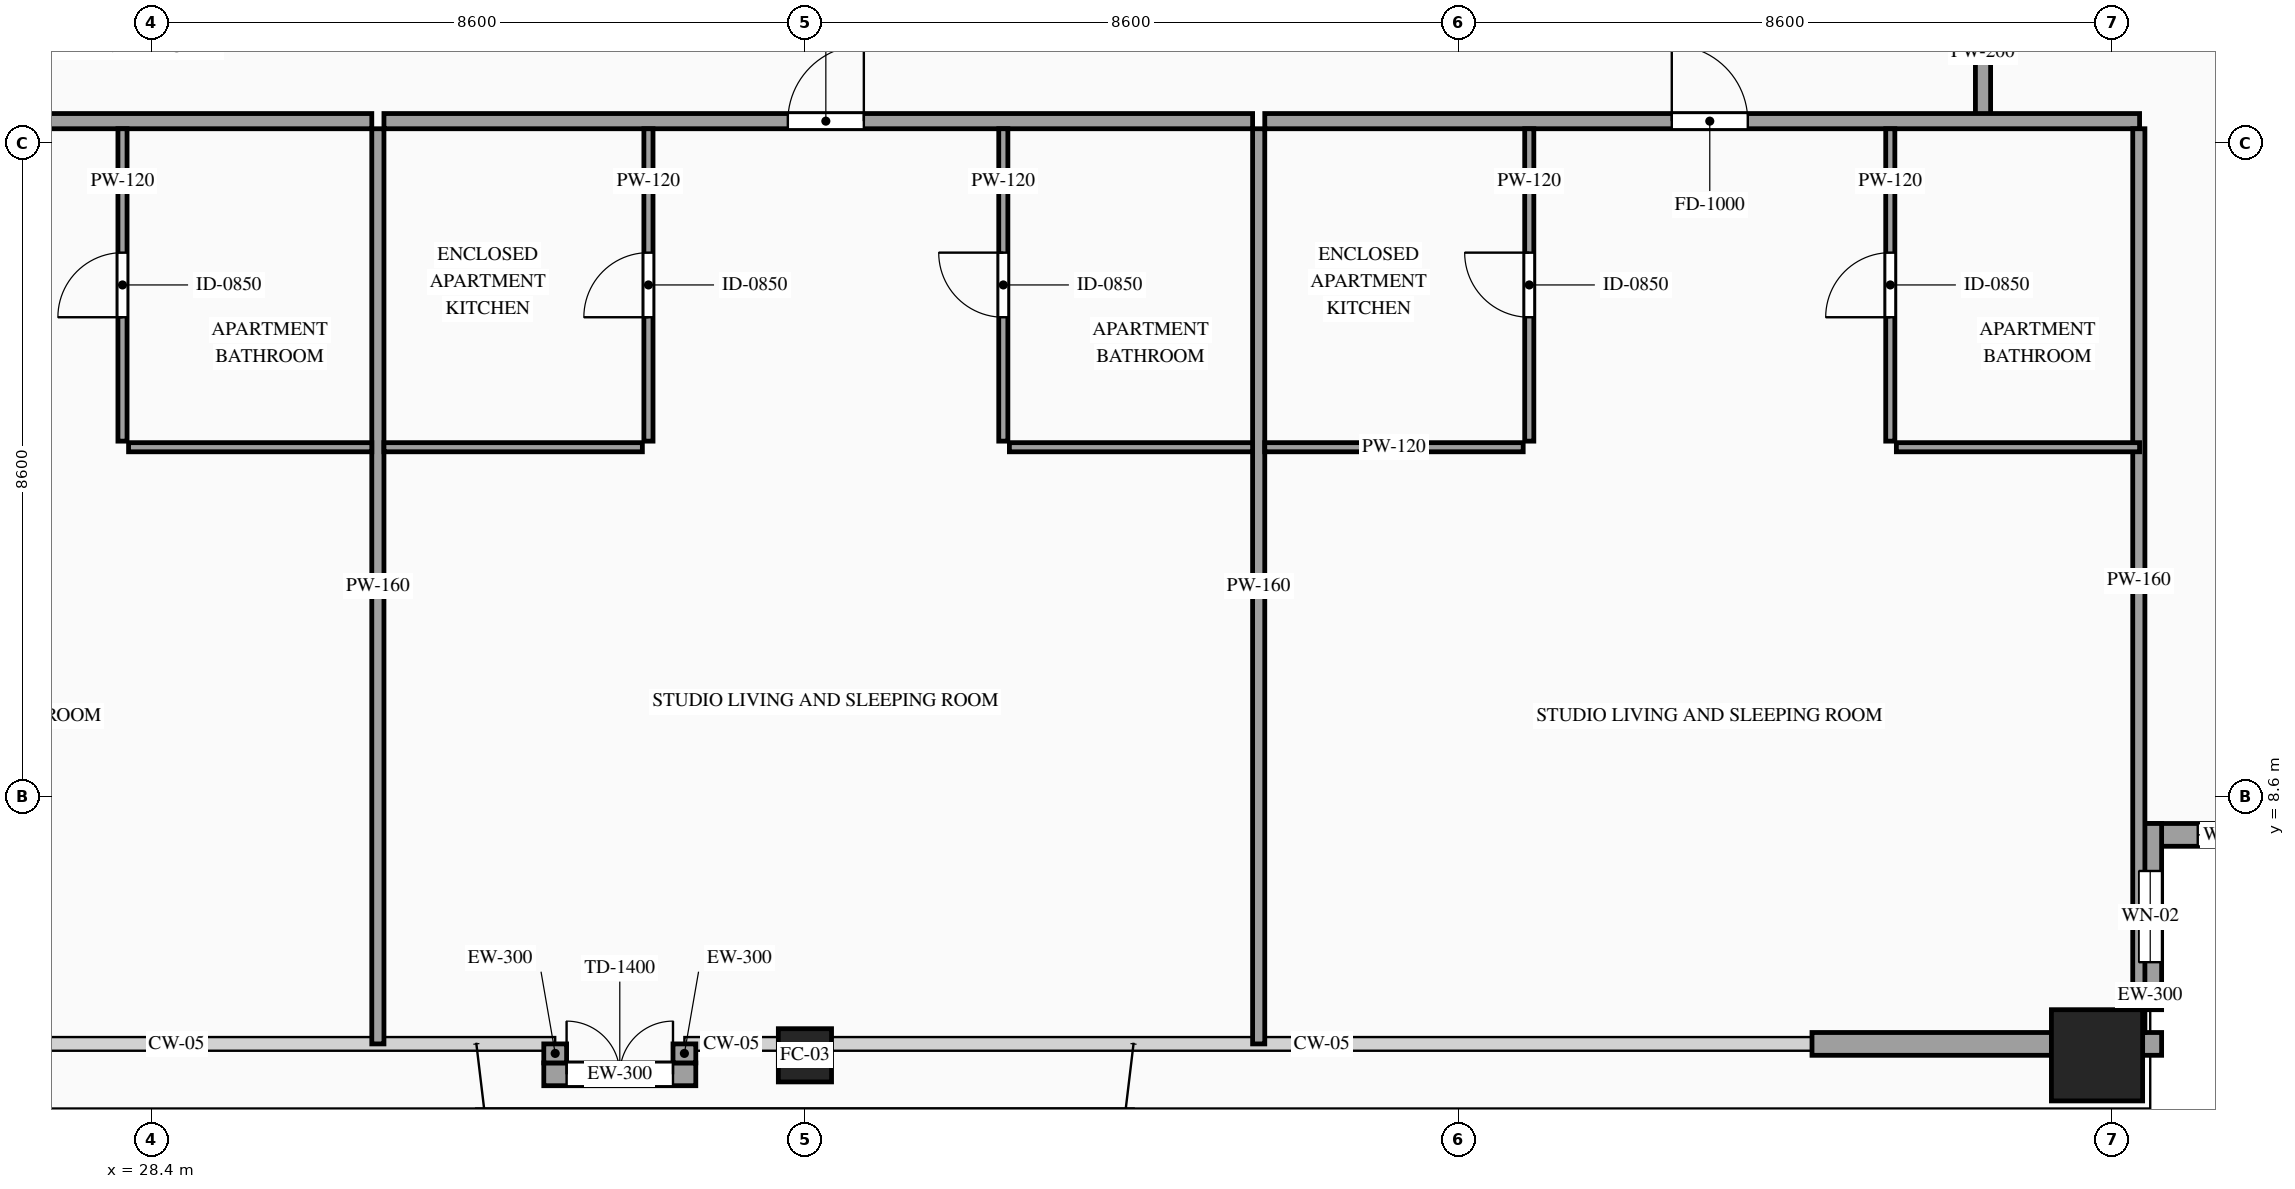
"""IFC4 building model, lengths in metres.
Left out: names, types, materials, properties, quantities, classifications, styles, units other than length and angle.
Written with IfcOpenShell. Run it as: python <this file> out.ifc"""

import sys

from ifc_helpers import new_model, si_unit, direction, frame, frame_2d, origin, origin_2d, place, context, subcontext, project, spatial, rectangle, hollow_rectangle, extrude, source, transform, mapped, element, fill, save


model = new_model("IFC4")
c1 = context("Model", 3, precision=1e-05, world=origin(), true_north=direction((0.0, 1.0)))
c2 = subcontext(c1, "Body", "Model", "MODEL_VIEW")
j1 = project(units=[si_unit("LENGTHUNIT", "METRE"), si_unit("PLANEANGLEUNIT", "RADIAN")], contexts=[c1])
p1 = place(None, origin())
s1 = spatial("IfcSite", under=j1, at=p1, CompositionType="ELEMENT")
p2 = place(p1, origin())
s2 = spatial("IfcBuilding", under=s1, at=p2, CompositionType="ELEMENT")
p3 = place(p2, frame((0.0, 0.0, 271.6)))
s3 = spatial("IfcBuildingStorey", under=s2, at=p3, CompositionType="ELEMENT", Elevation=271.6)
m1 = source(origin(), c2, "Body", "SweptSolid", [
    extrude(hollow_rectangle(XDim=0.7, YDim=0.7, WallThickness=0.032, at=origin_2d()), origin(), (0.0, 0.0, 1.0), 3.5),
])
p4 = place(p3, frame((37.0, 5.2, 0.0), z_axis=(0.0, 0.0, 1.0), x_axis=(1.0, 0.0, 0.0)))
e1 = element("IfcColumn", 1, at=p4, inside=s3, PredefinedType="COLUMN", context=c2, shape_type="MappedRepresentation", body=[
    mapped(m1, transform((0.0, 0.0, 0.0), scale=1.0)),
])
m2 = source(origin(), c2, "Body", "SweptSolid", [
    extrude(hollow_rectangle(XDim=1.2, YDim=1.2, WallThickness=0.055, at=origin_2d()), origin(), (0.0, 0.0, 1.0), 3.5),
])
p5 = place(p3, frame((54.0, 5.2, 0.0), z_axis=(0.0, 0.0, 1.0), x_axis=(1.0, 0.0, 0.0)))
e2 = element("IfcColumn", 2, at=p5, inside=s3, PredefinedType="COLUMN", context=c2, shape_type="MappedRepresentation", body=[
    mapped(m2, transform((0.0, 0.0, 0.0), scale=1.0)),
])
p6 = place(p3, frame((54.55, 8.1, 0.0), z_axis=(0.0, 0.0, 1.0), x_axis=(1.0, 0.0, 0.0)))
e3 = element("IfcWall", 3, at=p6, inside=s3, PredefinedType="SOLIDWALL", context=c2, shape_type="SweptSolid", body=[
    extrude(rectangle(XDim=2.45, YDim=0.3, at=frame_2d((1.225, 0.0))), origin(), (0.0, 0.0, 1.0), 3.28),
])
p7 = place(p6, frame((0.775, 0.0, 0.85)))
e4 = element("IfcOpeningElement", 4, at=p7, cuts=e3, PredefinedType="OPENING", context=c2, shape_type="SweptSolid", body=[
    extrude(rectangle(XDim=0.9, YDim=1.5, at=frame_2d((0.45, 0.75))), frame((0.0, 0.165, 0.0), z_axis=(0.0, -1.0, 0.0), x_axis=(1.0, 0.0, 0.0)), (0.0, 0.0, 1.0), 0.33),
])
p8 = place(p3, frame((54.7, 5.8, 0.0), z_axis=(0.0, 0.0, 1.0), x_axis=(0.0, 1.0, 0.0)))
e5 = element("IfcWall", 5, at=p8, inside=s3, PredefinedType="SOLIDWALL", context=c2, shape_type="SweptSolid", body=[
    extrude(rectangle(XDim=2.45, YDim=0.3, at=frame_2d((1.225, 0.0))), origin(), (0.0, 0.0, 1.0), 3.28),
])
p9 = place(p8, frame((0.625, 0.0, 0.85)))
e6 = element("IfcOpeningElement", 6, at=p9, cuts=e5, PredefinedType="OPENING", context=c2, shape_type="SweptSolid", body=[
    extrude(rectangle(XDim=1.2, YDim=2.1, at=frame_2d((0.6, 1.05))), frame((0.0, 0.165, 0.0), z_axis=(0.0, -1.0, 0.0), x_axis=(1.0, 0.0, 0.0)), (0.0, 0.0, 1.0), 0.33),
])
m3 = source(origin(), c2, "Body", "SweptSolid", [
    extrude(rectangle(XDim=0.25, YDim=0.3, at=frame_2d((0.125, 0.0))), origin(), (0.0, 0.0, 1.0), 3.28),
])
p10 = place(p3, frame((54.6, 5.35, 0.0), z_axis=(0.0, 0.0, 1.0), x_axis=(1.0, 0.0, 0.0)))
e7 = element("IfcWall", 7, at=p10, inside=s3, PredefinedType="SOLIDWALL", context=c2, shape_type="MappedRepresentation", body=[
    mapped(m3, transform((0.0, 0.0, 0.0), scale=1.0)),
])
m4 = source(origin(), c2, "Body", "SweptSolid", [
    extrude(rectangle(XDim=3.15, YDim=0.3, at=frame_2d((1.575, 0.0))), origin(), (0.0, 0.0, 1.0), 2.835),
])
p11 = place(p3, frame((50.25, 5.35, 0.0), z_axis=(0.0, 0.0, 1.0), x_axis=(1.0, 0.0, 0.0)))
e8 = element("IfcWall", 8, at=p11, inside=s3, PredefinedType="SOLIDWALL", context=c2, shape_type="MappedRepresentation", body=[
    mapped(m4, transform((0.0, 0.0, 0.0), scale=1.0)),
])
p12 = place(p3, frame((33.564, 4.95, 0.0), z_axis=(0.0, 0.0, 1.0), x_axis=(1.0, 0.0, 0.0)))
e9 = element("IfcWall", 9, at=p12, inside=s3, PredefinedType="SOLIDWALL", context=c2, shape_type="SweptSolid", body=[
    extrude(rectangle(XDim=2.0, YDim=0.3, at=frame_2d((1.0, 0.0))), origin(), (0.0, 0.0, 1.0), 2.835),
])
p13 = place(p12, frame((0.3, 0.0, 0.0)))
e10 = element("IfcOpeningElement", 10, at=p13, cuts=e9, PredefinedType="OPENING", context=c2, shape_type="SweptSolid", body=[
    extrude(rectangle(XDim=1.4, YDim=2.3, at=frame_2d((0.7, 1.15))), frame((0.0, 0.165, 0.0), z_axis=(0.0, -1.0, 0.0), x_axis=(1.0, 0.0, 0.0)), (0.0, 0.0, 1.0), 0.33),
])
for number, where, z_axis, x_axis in (
    (11, (33.714, 5.35, 0.0), (0.0, 0.0, 1.0), (0.0, -1.0, 0.0)),
    (12, (35.414, 5.1, 0.0), (0.0, 0.0, 1.0), (0.0, 1.0, 0.0)),
):
    element("IfcWall", number, at=place(p3, frame(where, z_axis=z_axis, x_axis=x_axis)), inside=s3, PredefinedType="SOLIDWALL", context=c2, shape_type="MappedRepresentation", body=[
        mapped(m3, transform((0.0, 0.0, 0.0), scale=1.0)),
    ])
m5 = source(origin(), c2, "Body", "SweptSolid", [
    extrude(rectangle(XDim=1.7, YDim=0.2, at=frame_2d((0.85, 0.0))), origin(), (0.0, 0.0, 1.0), 3.28),
])
p14 = place(p3, frame((52.5, 17.55, 0.0), z_axis=(0.0, 0.0, 1.0), x_axis=(0.0, 1.0, 0.0)))
e13 = element("IfcWall", 13, at=p14, inside=s3, PredefinedType="PARTITIONING", context=c2, shape_type="MappedRepresentation", body=[
    mapped(m5, transform((0.0, 0.0, 0.0), scale=1.0)),
])
p15 = place(p3, frame((19.44, 17.49, 0.0), z_axis=(0.0, 0.0, 1.0), x_axis=(1.0, 0.0, 0.0)))
e14 = element("IfcWall", 14, at=p15, inside=s3, PredefinedType="PARTITIONING", context=c2, shape_type="SweptSolid", body=[
    extrude(rectangle(XDim=11.861, YDim=0.2, at=frame_2d((5.931, 0.0))), origin(), (0.0, 0.0, 1.0), 3.28),
])
p16 = place(p15, frame((5.531, 0.0, 0.0)))
e15 = element("IfcOpeningElement", 15, at=p16, cuts=e14, PredefinedType="OPENING", context=c2, shape_type="SweptSolid", body=[
    extrude(rectangle(XDim=1.0, YDim=2.2, at=frame_2d((0.5, 1.1))), frame((0.0, 0.115, 0.0), z_axis=(0.0, -1.0, 0.0), x_axis=(1.0, 0.0, 0.0)), (0.0, 0.0, 1.0), 0.23),
])
m6 = source(origin(), c2, "Body", "SweptSolid", [
    extrude(rectangle(XDim=12.04, YDim=0.16, at=frame_2d((6.02, 0.0))), origin(), (0.0, 0.0, 1.0), 3.28),
])
p17 = place(p3, frame((31.381, 5.35, 0.0), z_axis=(0.0, 0.0, 1.0), x_axis=(0.0, 1.0, 0.0)))
e16 = element("IfcWall", 16, at=p17, inside=s3, PredefinedType="PARTITIONING", context=c2, shape_type="MappedRepresentation", body=[
    mapped(m6, transform((0.0, 0.0, 0.0), scale=1.0)),
])
m7 = source(origin(), c2, "Body", "SweptSolid", [
    extrude(rectangle(XDim=3.2, YDim=0.12, at=frame_2d((1.6, 0.0))), origin(), (0.0, 0.0, 1.0), 3.28),
])
p18 = place(p3, frame((28.101, 13.2, 0.0), z_axis=(0.0, 0.0, 1.0), x_axis=(1.0, 0.0, 0.0)))
e17 = element("IfcWall", 17, at=p18, inside=s3, PredefinedType="PARTITIONING", context=c2, shape_type="MappedRepresentation", body=[
    mapped(m7, transform((0.0, 0.0, 0.0), scale=1.0)),
])
p19 = place(p3, frame((28.021, 13.28, 0.0), z_axis=(0.0, 0.0, 1.0), x_axis=(0.0, 1.0, 0.0)))
e18 = element("IfcWall", 18, at=p19, inside=s3, PredefinedType="PARTITIONING", context=c2, shape_type="SweptSolid", body=[
    extrude(rectangle(XDim=4.11, YDim=0.12, at=frame_2d((2.055, 0.0))), origin(), (0.0, 0.0, 1.0), 3.28),
])
p20 = place(p19, frame((1.63, 0.0, 0.0)))
e19 = element("IfcOpeningElement", 19, at=p20, cuts=e18, PredefinedType="OPENING", context=c2, shape_type="SweptSolid", body=[
    extrude(rectangle(XDim=0.85, YDim=2.1, at=frame_2d((0.425, 1.05))), frame((0.0, 0.075, 0.0), z_axis=(0.0, -1.0, 0.0), x_axis=(1.0, 0.0, 0.0)), (0.0, 0.0, 1.0), 0.15),
])
p21 = place(p3, frame((31.461, 17.49, 0.0), z_axis=(0.0, 0.0, 1.0), x_axis=(1.0, 0.0, 0.0)))
e20 = element("IfcWall", 20, at=p21, inside=s3, PredefinedType="PARTITIONING", context=c2, shape_type="SweptSolid", body=[
    extrude(rectangle(XDim=11.429, YDim=0.2, at=frame_2d((5.714, 0.0))), origin(), (0.0, 0.0, 1.0), 3.28),
])
p22 = place(p21, frame((5.314, 0.0, 0.0)))
e21 = element("IfcOpeningElement", 21, at=p22, cuts=e20, PredefinedType="OPENING", context=c2, shape_type="SweptSolid", body=[
    extrude(rectangle(XDim=1.0, YDim=2.2, at=frame_2d((0.5, 1.1))), frame((0.0, 0.115, 0.0), z_axis=(0.0, -1.0, 0.0), x_axis=(1.0, 0.0, 0.0)), (0.0, 0.0, 1.0), 0.23),
])
p23 = place(p3, frame((42.97, 5.35, 0.0), z_axis=(0.0, 0.0, 1.0), x_axis=(0.0, 1.0, 0.0)))
e22 = element("IfcWall", 22, at=p23, inside=s3, PredefinedType="PARTITIONING", context=c2, shape_type="MappedRepresentation", body=[
    mapped(m6, transform((0.0, 0.0, 0.0), scale=1.0)),
])
m8 = source(origin(), c2, "Body", "SweptSolid", [
    extrude(rectangle(XDim=3.4, YDim=0.12, at=frame_2d((1.7, 0.0))), origin(), (0.0, 0.0, 1.0), 3.28),
])
p24 = place(p3, frame((31.461, 13.2, 0.0), z_axis=(0.0, 0.0, 1.0), x_axis=(1.0, 0.0, 0.0)))
e23 = element("IfcWall", 23, at=p24, inside=s3, PredefinedType="PARTITIONING", context=c2, shape_type="MappedRepresentation", body=[
    mapped(m8, transform((0.0, 0.0, 0.0), scale=1.0)),
])
p25 = place(p3, frame((34.941, 13.28, 0.0), z_axis=(0.0, 0.0, 1.0), x_axis=(0.0, 1.0, 0.0)))
e24 = element("IfcWall", 24, at=p25, inside=s3, PredefinedType="PARTITIONING", context=c2, shape_type="SweptSolid", body=[
    extrude(rectangle(XDim=4.11, YDim=0.12, at=frame_2d((2.055, 0.0))), origin(), (0.0, 0.0, 1.0), 3.28),
])
p26 = place(p25, frame((1.63, 0.0, 0.0)))
e25 = element("IfcOpeningElement", 25, at=p26, cuts=e24, PredefinedType="OPENING", context=c2, shape_type="SweptSolid", body=[
    extrude(rectangle(XDim=0.85, YDim=2.1, at=frame_2d((0.425, 1.05))), frame((0.0, 0.075, 0.0), z_axis=(0.0, -1.0, 0.0), x_axis=(1.0, 0.0, 0.0)), (0.0, 0.0, 1.0), 0.15),
])
p27 = place(p3, frame((39.69, 13.2, 0.0), z_axis=(0.0, 0.0, 1.0), x_axis=(1.0, 0.0, 0.0)))
e26 = element("IfcWall", 26, at=p27, inside=s3, PredefinedType="PARTITIONING", context=c2, shape_type="MappedRepresentation", body=[
    mapped(m7, transform((0.0, 0.0, 0.0), scale=1.0)),
])
p28 = place(p3, frame((39.61, 13.28, 0.0), z_axis=(0.0, 0.0, 1.0), x_axis=(0.0, 1.0, 0.0)))
e27 = element("IfcWall", 27, at=p28, inside=s3, PredefinedType="PARTITIONING", context=c2, shape_type="SweptSolid", body=[
    extrude(rectangle(XDim=4.11, YDim=0.12, at=frame_2d((2.055, 0.0))), origin(), (0.0, 0.0, 1.0), 3.28),
])
p29 = place(p28, frame((1.63, 0.0, 0.0)))
e28 = element("IfcOpeningElement", 28, at=p29, cuts=e27, PredefinedType="OPENING", context=c2, shape_type="SweptSolid", body=[
    extrude(rectangle(XDim=0.85, YDim=2.1, at=frame_2d((0.425, 1.05))), frame((0.0, 0.075, 0.0), z_axis=(0.0, -1.0, 0.0), x_axis=(1.0, 0.0, 0.0)), (0.0, 0.0, 1.0), 0.15),
])
p30 = place(p3, frame((43.05, 17.49, 0.0), z_axis=(0.0, 0.0, 1.0), x_axis=(1.0, 0.0, 0.0)))
e29 = element("IfcWall", 29, at=p30, inside=s3, PredefinedType="PARTITIONING", context=c2, shape_type="SweptSolid", body=[
    extrude(rectangle(XDim=11.51, YDim=0.2, at=frame_2d((5.755, 0.0))), origin(), (0.0, 0.0, 1.0), 3.28),
])
p31 = place(p30, frame((5.355, 0.0, 0.0)))
e30 = element("IfcOpeningElement", 30, at=p31, cuts=e29, PredefinedType="OPENING", context=c2, shape_type="SweptSolid", body=[
    extrude(rectangle(XDim=1.0, YDim=2.2, at=frame_2d((0.5, 1.1))), frame((0.0, 0.115, 0.0), z_axis=(0.0, -1.0, 0.0), x_axis=(1.0, 0.0, 0.0)), (0.0, 0.0, 1.0), 0.23),
])
m9 = source(origin(), c2, "Body", "SweptSolid", [
    extrude(rectangle(XDim=11.89, YDim=0.16, at=frame_2d((5.945, 0.0))), origin(), (0.0, 0.0, 1.0), 3.28),
])
p32 = place(p3, frame((54.55, 5.5, 0.0), z_axis=(0.0, 0.0, 1.0), x_axis=(0.0, 1.0, 0.0)))
e31 = element("IfcWall", 31, at=p32, inside=s3, PredefinedType="PARTITIONING", context=c2, shape_type="MappedRepresentation", body=[
    mapped(m9, transform((0.0, 0.0, 0.0), scale=1.0)),
])
m10 = source(origin(), c2, "Body", "SweptSolid", [
    extrude(rectangle(XDim=3.4, YDim=0.12, at=frame_2d((1.7, 0.0))), origin(), (0.0, 0.0, 1.0), 3.28),
])
p33 = place(p3, frame((43.05, 13.2, 0.0), z_axis=(0.0, 0.0, 1.0), x_axis=(1.0, 0.0, 0.0)))
e32 = element("IfcWall", 32, at=p33, inside=s3, PredefinedType="PARTITIONING", context=c2, shape_type="MappedRepresentation", body=[
    mapped(m10, transform((0.0, 0.0, 0.0), scale=1.0)),
])
p34 = place(p3, frame((46.53, 13.28, 0.0), z_axis=(0.0, 0.0, 1.0), x_axis=(0.0, 1.0, 0.0)))
e33 = element("IfcWall", 33, at=p34, inside=s3, PredefinedType="PARTITIONING", context=c2, shape_type="SweptSolid", body=[
    extrude(rectangle(XDim=4.11, YDim=0.12, at=frame_2d((2.055, 0.0))), origin(), (0.0, 0.0, 1.0), 3.28),
])
p35 = place(p34, frame((1.63, 0.0, 0.0)))
e34 = element("IfcOpeningElement", 34, at=p35, cuts=e33, PredefinedType="OPENING", context=c2, shape_type="SweptSolid", body=[
    extrude(rectangle(XDim=0.85, YDim=2.1, at=frame_2d((0.425, 1.05))), frame((0.0, 0.075, 0.0), z_axis=(0.0, -1.0, 0.0), x_axis=(1.0, 0.0, 0.0)), (0.0, 0.0, 1.0), 0.15),
])
p36 = place(p3, frame((51.36, 13.2, 0.0), z_axis=(0.0, 0.0, 1.0), x_axis=(1.0, 0.0, 0.0)))
e35 = element("IfcWall", 35, at=p36, inside=s3, PredefinedType="PARTITIONING", context=c2, shape_type="MappedRepresentation", body=[
    mapped(m7, transform((0.0, 0.0, 0.0), scale=1.0)),
])
p37 = place(p3, frame((51.28, 13.28, 0.0), z_axis=(0.0, 0.0, 1.0), x_axis=(0.0, 1.0, 0.0)))
e36 = element("IfcWall", 36, at=p37, inside=s3, PredefinedType="PARTITIONING", context=c2, shape_type="SweptSolid", body=[
    extrude(rectangle(XDim=4.11, YDim=0.12, at=frame_2d((2.055, 0.0))), origin(), (0.0, 0.0, 1.0), 3.28),
])
p38 = place(p37, frame((1.63, 0.0, 0.0)))
e37 = element("IfcOpeningElement", 37, at=p38, cuts=e36, PredefinedType="OPENING", context=c2, shape_type="SweptSolid", body=[
    extrude(rectangle(XDim=0.85, YDim=2.1, at=frame_2d((0.425, 1.05))), frame((0.0, 0.075, 0.0), z_axis=(0.0, -1.0, 0.0), x_axis=(1.0, 0.0, 0.0)), (0.0, 0.0, 1.0), 0.15),
])
m11 = source(origin(), c2, "Body", "SweptSolid", [
    extrude(rectangle(XDim=0.9, YDim=1.5, at=frame_2d((0.45, 0.75))), frame((0.0, 0.03, 0.0), z_axis=(0.0, -1.0, 0.0), x_axis=(1.0, 0.0, 0.0)), (0.0, 0.0, 1.0), 0.06),
])
p39 = place(p7, origin())
e38 = element("IfcWindow", 38, at=p39, inside=s3, PartitioningType="SINGLE_PANEL", PredefinedType="WINDOW", context=c2, shape_type="MappedRepresentation", body=[
    mapped(m11, transform((0.0, 0.0, 0.0), scale=1.0)),
])
fill(e4, e38)
m12 = source(origin(), c2, "Body", "SweptSolid", [
    extrude(rectangle(XDim=1.2, YDim=2.1, at=frame_2d((0.6, 1.05))), frame((0.0, 0.03, 0.0), z_axis=(0.0, -1.0, 0.0), x_axis=(1.0, 0.0, 0.0)), (0.0, 0.0, 1.0), 0.06),
])
p40 = place(p9, origin())
e39 = element("IfcWindow", 39, at=p40, inside=s3, PartitioningType="SINGLE_PANEL", PredefinedType="WINDOW", context=c2, shape_type="MappedRepresentation", body=[
    mapped(m12, transform((0.0, 0.0, 0.0), scale=1.0)),
])
fill(e6, e39)
m13 = source(origin(), c2, "Body", "SweptSolid", [
    extrude(rectangle(XDim=1.4, YDim=2.3, at=frame_2d((0.7, 1.15))), frame((0.0, 0.025, 0.0), z_axis=(0.0, -1.0, 0.0), x_axis=(1.0, 0.0, 0.0)), (0.0, 0.0, 1.0), 0.05),
])
p41 = place(p13, origin())
e40 = element("IfcDoor", 40, at=p41, inside=s3, OperationType="DOUBLE_DOOR_SINGLE_SWING", PredefinedType="DOOR", context=c2, shape_type="MappedRepresentation", body=[
    mapped(m13, transform((0.0, 0.0, 0.0), scale=1.0)),
])
fill(e10, e40)
m14 = source(origin(), c2, "Body", "SweptSolid", [
    extrude(rectangle(XDim=0.85, YDim=2.1, at=frame_2d((0.425, 1.05))), frame((0.0, 0.025, 0.0), z_axis=(0.0, -1.0, 0.0), x_axis=(1.0, 0.0, 0.0)), (0.0, 0.0, 1.0), 0.05),
])
p42 = place(p20, origin())
e41 = element("IfcDoor", 41, at=p42, inside=s3, OperationType="SINGLE_SWING_LEFT", PredefinedType="DOOR", context=c2, shape_type="MappedRepresentation", body=[
    mapped(m14, transform((0.0, 0.0, 0.0), scale=1.0)),
])
fill(e19, e41)
m15 = source(origin(), c2, "Body", "SweptSolid", [
    extrude(rectangle(XDim=1.0, YDim=2.2, at=frame_2d((0.5, 1.1))), frame((0.0, 0.025, 0.0), z_axis=(0.0, -1.0, 0.0), x_axis=(1.0, 0.0, 0.0)), (0.0, 0.0, 1.0), 0.05),
])
p43 = place(p22, origin())
e42 = element("IfcDoor", 42, at=p43, inside=s3, OperationType="SINGLE_SWING_RIGHT", PredefinedType="DOOR", context=c2, shape_type="MappedRepresentation", body=[
    mapped(m15, transform((0.0, 0.0, 0.0), scale=1.0)),
])
fill(e21, e42)
p44 = place(p26, origin())
e43 = element("IfcDoor", 43, at=p44, inside=s3, OperationType="SINGLE_SWING_LEFT", PredefinedType="DOOR", context=c2, shape_type="MappedRepresentation", body=[
    mapped(m14, transform((0.0, 0.0, 0.0), scale=1.0)),
])
fill(e25, e43)
p45 = place(p29, origin())
e44 = element("IfcDoor", 44, at=p45, inside=s3, OperationType="SINGLE_SWING_RIGHT", PredefinedType="DOOR", context=c2, shape_type="MappedRepresentation", body=[
    mapped(m14, transform((0.0, 0.0, 0.0), scale=1.0)),
])
fill(e28, e44)
p46 = place(p31, origin())
e45 = element("IfcDoor", 45, at=p46, inside=s3, OperationType="SINGLE_SWING_LEFT", PredefinedType="DOOR", context=c2, shape_type="MappedRepresentation", body=[
    mapped(m15, transform((0.0, 0.0, 0.0), scale=1.0)),
])
fill(e30, e45)
p47 = place(p35, origin())
e46 = element("IfcDoor", 46, at=p47, inside=s3, OperationType="SINGLE_SWING_RIGHT", PredefinedType="DOOR", context=c2, shape_type="MappedRepresentation", body=[
    mapped(m14, transform((0.0, 0.0, 0.0), scale=1.0)),
])
fill(e34, e46)
p48 = place(p38, origin())
e47 = element("IfcDoor", 47, at=p48, inside=s3, OperationType="SINGLE_SWING_LEFT", PredefinedType="DOOR", context=c2, shape_type="MappedRepresentation", body=[
    mapped(m14, transform((0.0, 0.0, 0.0), scale=1.0)),
])
fill(e37, e47)
save(model, sys.argv[1])
